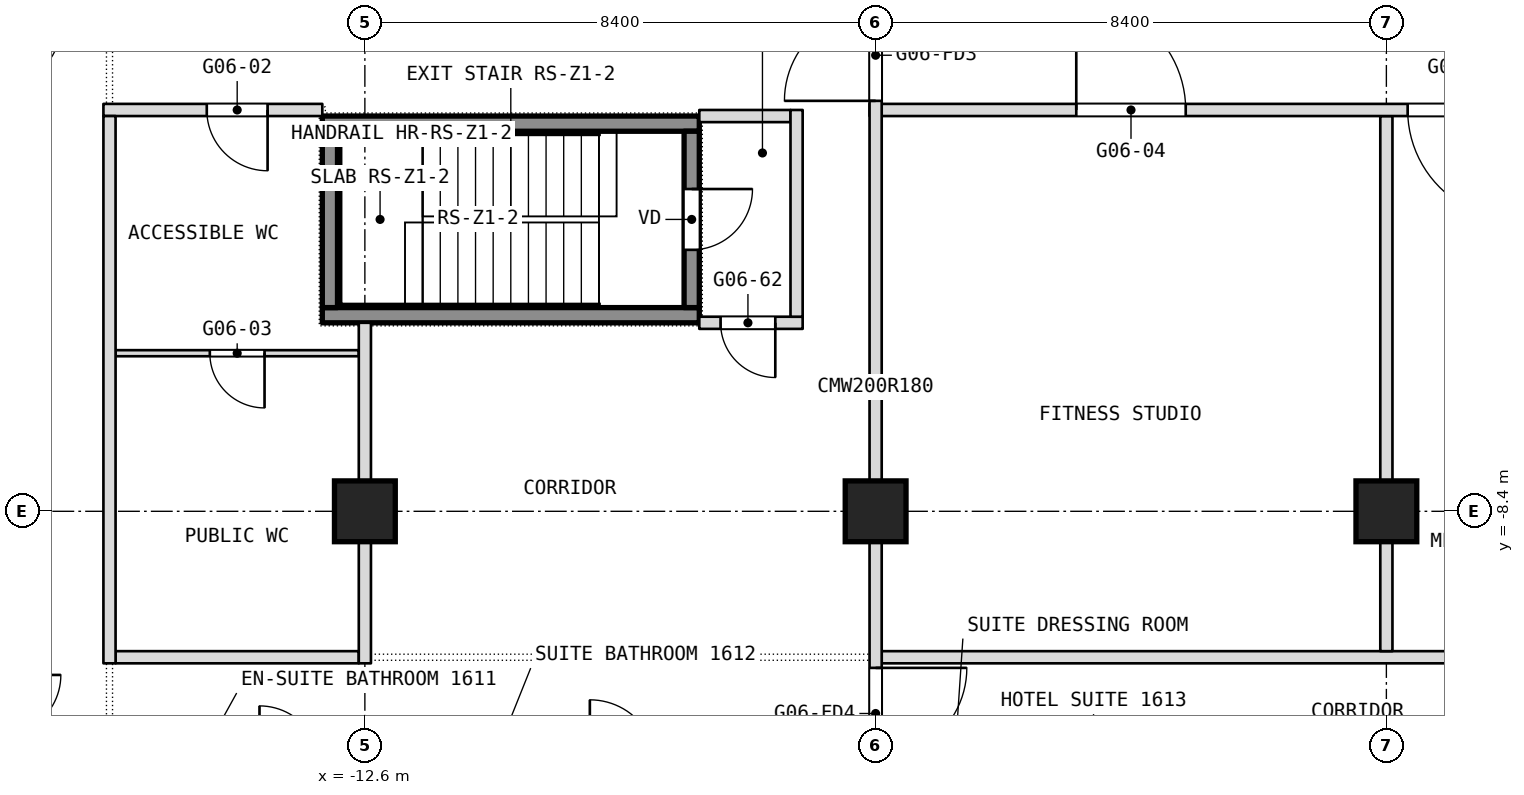
"""IFC4 building model, lengths in metres.
Left out: names, types, materials, properties, quantities, classifications, styles, units other than length and angle.
Written with IfcOpenShell. Run it as: python <this file> out.ifc"""

import sys

from ifc_helpers import new_model, si_unit, direction, frame, frame_2d, origin, origin_2d, place, context, subcontext, project, spatial, rectangle, extrude, element, fill, save


model = new_model("IFC4")
c1 = context("Model", 3, precision=1e-05, world=origin(), true_north=direction((0.0, 1.0)))
c2 = subcontext(c1, "Body", "Model", "MODEL_VIEW")
j1 = project(units=[si_unit("LENGTHUNIT", "METRE"), si_unit("PLANEANGLEUNIT", "RADIAN")], contexts=[c1])
p1 = place(None, origin())
s1 = spatial("IfcSite", under=j1, at=p1, CompositionType="ELEMENT")
p2 = place(p1, origin())
s2 = spatial("IfcBuilding", under=s1, at=p2, CompositionType="ELEMENT")
p3 = place(p2, frame((0.0, 0.0, 72.5)))
s3 = spatial("IfcBuildingStorey", under=s2, at=p3, CompositionType="ELEMENT", Elevation=72.5)
for number, where, z_axis, x_axis in (
    (1, (-12.6, -8.4, 0.0), (0.0, 0.0, 1.0), (1.0, 0.0, 0.0)),
    (2, (-4.2, -8.4, 0.0), (0.0, 0.0, 1.0), (1.0, 0.0, 0.0)),
    (3, (4.2, -8.4, 0.0), (0.0, 0.0, 1.0), (1.0, 0.0, 0.0)),
):
    element("IfcColumn", number, at=place(p3, frame(where, z_axis=z_axis, x_axis=x_axis)), inside=s3, PredefinedType="COLUMN", context=c2, shape_type="SweptSolid", body=[
        extrude(rectangle(XDim=1.0, YDim=1.0, at=origin_2d()), origin(), (0.0, 0.0, 1.0), 3.6),
    ])
p4 = place(p3, frame((-16.7, -10.8, 0.0), z_axis=(0.0, 0.0, 1.0), x_axis=(1.0, 0.0, 0.0)))
e4 = element("IfcWall", 4, at=p4, inside=s3, PredefinedType="PARTITIONING", context=c2, shape_type="SweptSolid", body=[
    extrude(rectangle(XDim=4.0, YDim=0.2, at=frame_2d((2.0, 0.0))), origin(), (0.0, 0.0, 1.0), 3.34),
])
p5 = place(p3, frame((-4.1, -10.8, 0.0), z_axis=(0.0, 0.0, 1.0), x_axis=(1.0, 0.0, 0.0)))
e5 = element("IfcWall", 5, at=p5, inside=s3, PredefinedType="PARTITIONING", context=c2, shape_type="SweptSolid", body=[
    extrude(rectangle(XDim=20.8, YDim=0.2, at=frame_2d((10.4, 0.0))), origin(), (0.0, 0.0, 1.0), 3.34),
])
p6 = place(p3, frame((-16.7, -5.8, 0.0), z_axis=(0.0, 0.0, 1.0), x_axis=(1.0, 0.0, 0.0)))
e6 = element("IfcWall", 6, at=p6, inside=s3, PredefinedType="PARTITIONING", context=c2, shape_type="SweptSolid", body=[
    extrude(rectangle(XDim=4.0, YDim=0.1, at=frame_2d((2.0, 0.0))), origin(), (0.0, 0.0, 1.0), 3.34),
])
p7 = place(p6, frame((1.55, 0.0, 0.0)))
e7 = element("IfcOpeningElement", 7, at=p7, cuts=e6, PredefinedType="OPENING", context=c2, shape_type="SweptSolid", body=[
    extrude(rectangle(XDim=0.9, YDim=2.1, at=frame_2d((0.45, 1.05))), frame((0.0, 0.05, 0.0), z_axis=(0.0, -1.0, 0.0), x_axis=(1.0, 0.0, 0.0)), (0.0, 0.0, 1.0), 0.1),
])
p8 = place(p3, frame((-7.1, -5.3, 0.0), z_axis=(0.0, 0.0, 1.0), x_axis=(1.0, 0.0, 0.0)))
e8 = element("IfcWall", 8, at=p8, inside=s3, PredefinedType="PARTITIONING", context=c2, shape_type="SweptSolid", body=[
    extrude(rectangle(XDim=1.7, YDim=0.2, at=frame_2d((0.85, 0.0))), origin(), (0.0, 0.0, 1.0), 3.34),
])
p9 = place(p8, frame((0.35, 0.0, 0.0)))
e9 = element("IfcOpeningElement", 9, at=p9, cuts=e8, PredefinedType="OPENING", context=c2, shape_type="SweptSolid", body=[
    extrude(rectangle(XDim=0.9, YDim=2.1, at=frame_2d((0.45, 1.05))), frame((0.0, 0.1, 0.0), z_axis=(0.0, -1.0, 0.0), x_axis=(1.0, 0.0, 0.0)), (0.0, 0.0, 1.0), 0.2),
])
p10 = place(p3, frame((4.2, -10.7, 0.0), z_axis=(0.0, 0.0, 1.0), x_axis=(0.0, 1.0, 0.0)))
e10 = element("IfcWall", 10, at=p10, inside=s3, PredefinedType="PARTITIONING", context=c2, shape_type="SweptSolid", body=[
    extrude(rectangle(XDim=8.8, YDim=0.2, at=frame_2d((4.4, 0.0))), origin(), (0.0, 0.0, 1.0), 3.34),
])
p11 = place(p3, frame((-7.1, -1.9, 0.0), z_axis=(0.0, 0.0, 1.0), x_axis=(1.0, 0.0, 0.0)))
e11 = element("IfcWall", 11, at=p11, inside=s3, PredefinedType="PARTITIONING", context=c2, shape_type="SweptSolid", body=[
    extrude(rectangle(XDim=1.5, YDim=0.2, at=frame_2d((0.75, 0.0))), origin(), (0.0, 0.0, 1.0), 3.34),
])
p12 = place(p3, frame((-16.9, -1.8, 0.0), z_axis=(0.0, 0.0, 1.0), x_axis=(1.0, 0.0, 0.0)))
e12 = element("IfcWall", 12, at=p12, inside=s3, PredefinedType="PARTITIONING", context=c2, shape_type="SweptSolid", body=[
    extrude(rectangle(XDim=3.6, YDim=0.2, at=frame_2d((1.8, 0.0))), origin(), (0.0, 0.0, 1.0), 3.34),
])
p13 = place(p12, frame((1.7, 0.0, 0.0)))
e13 = element("IfcOpeningElement", 13, at=p13, cuts=e12, PredefinedType="OPENING", context=c2, shape_type="SweptSolid", body=[
    extrude(rectangle(XDim=1.0, YDim=2.1, at=frame_2d((0.5, 1.05))), frame((0.0, 0.1, 0.0), z_axis=(0.0, -1.0, 0.0), x_axis=(1.0, 0.0, 0.0)), (0.0, 0.0, 1.0), 0.2),
])
p14 = place(p3, frame((-4.3, -1.8, 0.0), z_axis=(0.0, 0.0, 1.0), x_axis=(1.0, 0.0, 0.0)))
e14 = element("IfcWall", 14, at=p14, inside=s3, PredefinedType="PARTITIONING", context=c2, shape_type="SweptSolid", body=[
    extrude(rectangle(XDim=10.9, YDim=0.2, at=frame_2d((5.45, 0.0))), origin(), (0.0, 0.0, 1.0), 3.34),
])
p15 = place(p14, frame((3.4, 0.0, 0.0)))
e15 = element("IfcOpeningElement", 15, at=p15, cuts=e14, PredefinedType="OPENING", context=c2, shape_type="SweptSolid", body=[
    extrude(rectangle(XDim=1.8, YDim=2.1, at=frame_2d((0.9, 1.05))), frame((0.0, 0.1, 0.0), z_axis=(0.0, -1.0, 0.0), x_axis=(1.0, 0.0, 0.0)), (0.0, 0.0, 1.0), 0.2),
])
p16 = place(p14, frame((8.85, 0.0, 0.0)))
e16 = element("IfcOpeningElement", 16, at=p16, cuts=e14, PredefinedType="OPENING", context=c2, shape_type="SweptSolid", body=[
    extrude(rectangle(XDim=1.8, YDim=2.1, at=frame_2d((0.9, 1.05))), frame((0.0, 0.1, 0.0), z_axis=(0.0, -1.0, 0.0), x_axis=(1.0, 0.0, 0.0)), (0.0, 0.0, 1.0), 0.2),
])
p17 = place(p3, frame((-4.2, -12.7, 0.0), z_axis=(0.0, 0.0, 1.0), x_axis=(0.0, 1.0, 0.0)))
e17 = element("IfcWall", 17, at=p17, inside=s3, PredefinedType="PARTITIONING", context=c2, shape_type="SweptSolid", body=[
    extrude(rectangle(XDim=12.7, YDim=0.2, at=frame_2d((6.35, 0.0))), origin(), (0.0, 0.0, 1.0), 3.34),
])
p18 = place(p17, frame((11.05, 0.0, 0.0)))
e18 = element("IfcOpeningElement", 18, at=p18, cuts=e17, PredefinedType="OPENING", context=c2, shape_type="SweptSolid", body=[
    extrude(rectangle(XDim=1.5, YDim=2.1, at=frame_2d((0.75, 1.05))), frame((0.0, 0.1, 0.0), z_axis=(0.0, -1.0, 0.0), x_axis=(1.0, 0.0, 0.0)), (0.0, 0.0, 1.0), 0.2),
])
p19 = place(p17, frame((0.225, 0.0, 0.0)))
e19 = element("IfcOpeningElement", 19, at=p19, cuts=e17, PredefinedType="OPENING", context=c2, shape_type="SweptSolid", body=[
    extrude(rectangle(XDim=1.5, YDim=2.1, at=frame_2d((0.75, 1.05))), frame((0.0, 0.1, 0.0), z_axis=(0.0, -1.0, 0.0), x_axis=(1.0, 0.0, 0.0)), (0.0, 0.0, 1.0), 0.2),
])
p20 = place(p3, frame((-5.5, -5.2, 0.0), z_axis=(0.0, 0.0, 1.0), x_axis=(0.0, 1.0, 0.0)))
e20 = element("IfcWall", 20, at=p20, inside=s3, PredefinedType="PARTITIONING", context=c2, shape_type="SweptSolid", body=[
    extrude(rectangle(XDim=3.4, YDim=0.2, at=frame_2d((1.7, 0.0))), origin(), (0.0, 0.0, 1.0), 3.34),
])
p21 = place(p3, frame((-12.6, -10.9, 0.0), z_axis=(0.0, 0.0, 1.0), x_axis=(0.0, 1.0, 0.0)))
e21 = element("IfcWall", 21, at=p21, inside=s3, PredefinedType="PARTITIONING", context=c2, shape_type="SweptSolid", body=[
    extrude(rectangle(XDim=5.6, YDim=0.2, at=frame_2d((2.8, 0.0))), origin(), (0.0, 0.0, 1.0), 3.34),
])
p22 = place(p3, frame((-16.8, -10.9, 0.0), z_axis=(0.0, 0.0, 1.0), x_axis=(0.0, 1.0, 0.0)))
e22 = element("IfcWall", 22, at=p22, inside=s3, PredefinedType="PARTITIONING", context=c2, shape_type="SweptSolid", body=[
    extrude(rectangle(XDim=9.0, YDim=0.2, at=frame_2d((4.5, 0.0))), origin(), (0.0, 0.0, 1.0), 3.34),
])
for number, where, z_axis, x_axis in (
    (23, (-13.3, -5.175, 0.1), (0.0, 0.0, 1.0), (1.0, 0.0, 0.0)),
    (24, (-13.3, -2.025, 0.1), (0.0, 0.0, 1.0), (1.0, 0.0, 0.0)),
):
    element("IfcWall", number, at=place(p3, frame(where, z_axis=z_axis, x_axis=x_axis)), inside=s3, PredefinedType="SHEAR", context=c2, shape_type="SweptSolid", body=[
        extrude(rectangle(XDim=6.2, YDim=0.25, at=frame_2d((3.1, 0.0))), origin(), (0.0, 0.0, 1.0), 3.6),
    ])
p23 = place(p3, frame((-13.175, -5.05, 0.1), z_axis=(0.0, 0.0, 1.0), x_axis=(0.0, 1.0, 0.0)))
e25 = element("IfcWall", 25, at=p23, inside=s3, PredefinedType="SHEAR", context=c2, shape_type="SweptSolid", body=[
    extrude(rectangle(XDim=2.9, YDim=0.25, at=frame_2d((1.45, 0.0))), origin(), (0.0, 0.0, 1.0), 3.6),
])
p24 = place(p3, frame((-7.225, -5.05, 0.1), z_axis=(0.0, 0.0, 1.0), x_axis=(0.0, 1.0, 0.0)))
e26 = element("IfcWall", 26, at=p24, inside=s3, PredefinedType="SHEAR", context=c2, shape_type="SweptSolid", body=[
    extrude(rectangle(XDim=2.9, YDim=0.25, at=frame_2d((1.45, 0.0))), origin(), (0.0, 0.0, 1.0), 3.6),
])
p25 = place(p24, frame((0.95, 0.0, 0.0)))
e27 = element("IfcOpeningElement", 27, at=p25, cuts=e26, PredefinedType="OPENING", context=c2, shape_type="SweptSolid", body=[
    extrude(rectangle(XDim=1.0, YDim=2.1, at=frame_2d((0.5, 1.05))), frame((0.0, 0.125, 0.0), z_axis=(0.0, -1.0, 0.0), x_axis=(1.0, 0.0, 0.0)), (0.0, 0.0, 1.0), 0.25),
])
p26 = place(p7, origin())
e28 = element("IfcDoor", 28, at=p26, inside=s3, OperationType="SINGLE_SWING_LEFT", PredefinedType="DOOR", context=c2, shape_type="SweptSolid", body=[
    extrude(rectangle(XDim=0.9, YDim=2.1, at=frame_2d((0.45, 1.05))), frame((0.0, 0.025, 0.0), z_axis=(0.0, -1.0, 0.0), x_axis=(1.0, 0.0, 0.0)), (0.0, 0.0, 1.0), 0.05),
])
fill(e7, e28)
p27 = place(p9, origin())
e29 = element("IfcDoor", 29, at=p27, inside=s3, OperationType="SINGLE_SWING_RIGHT", PredefinedType="DOOR", context=c2, shape_type="SweptSolid", body=[
    extrude(rectangle(XDim=0.9, YDim=2.1, at=frame_2d((0.45, 1.05))), frame((0.0, 0.025, 0.0), z_axis=(0.0, -1.0, 0.0), x_axis=(1.0, 0.0, 0.0)), (0.0, 0.0, 1.0), 0.05),
])
fill(e9, e29)
p28 = place(p13, origin())
e30 = element("IfcDoor", 30, at=p28, inside=s3, OperationType="SINGLE_SWING_RIGHT", PredefinedType="DOOR", context=c2, shape_type="SweptSolid", body=[
    extrude(rectangle(XDim=1.0, YDim=2.1, at=frame_2d((0.5, 1.05))), frame((0.0, 0.025, 0.0), z_axis=(0.0, -1.0, 0.0), x_axis=(1.0, 0.0, 0.0)), (0.0, 0.0, 1.0), 0.05),
])
fill(e13, e30)
p29 = place(p15, origin())
e31 = element("IfcDoor", 31, at=p29, inside=s3, OperationType="DOUBLE_DOOR_SINGLE_SWING", PredefinedType="DOOR", context=c2, shape_type="SweptSolid", body=[
    extrude(rectangle(XDim=1.8, YDim=2.1, at=frame_2d((0.9, 1.05))), frame((0.0, 0.025, 0.0), z_axis=(0.0, -1.0, 0.0), x_axis=(1.0, 0.0, 0.0)), (0.0, 0.0, 1.0), 0.05),
])
fill(e15, e31)
p30 = place(p16, origin())
e32 = element("IfcDoor", 32, at=p30, inside=s3, OperationType="DOUBLE_DOOR_SINGLE_SWING", PredefinedType="DOOR", context=c2, shape_type="SweptSolid", body=[
    extrude(rectangle(XDim=1.8, YDim=2.1, at=frame_2d((0.9, 1.05))), frame((0.0, 0.025, 0.0), z_axis=(0.0, -1.0, 0.0), x_axis=(1.0, 0.0, 0.0)), (0.0, 0.0, 1.0), 0.05),
])
fill(e16, e32)
p31 = place(p25, origin())
e33 = element("IfcDoor", 33, at=p31, inside=s3, OperationType="SINGLE_SWING_LEFT", PredefinedType="DOOR", context=c2, shape_type="SweptSolid", body=[
    extrude(rectangle(XDim=1.0, YDim=2.1, at=frame_2d((0.5, 1.05))), frame((0.0, 0.025, 0.0), z_axis=(0.0, -1.0, 0.0), x_axis=(1.0, 0.0, 0.0)), (0.0, 0.0, 1.0), 0.05),
])
fill(e27, e33)
p32 = place(p18, origin())
e34 = element("IfcDoor", 34, at=p32, inside=s3, OperationType="DOUBLE_DOOR_DOUBLE_SWING", PredefinedType="DOOR", context=c2, shape_type="SweptSolid", body=[
    extrude(rectangle(XDim=1.5, YDim=2.1, at=frame_2d((0.75, 1.05))), frame((0.0, 0.025, 0.0), z_axis=(0.0, -1.0, 0.0), x_axis=(1.0, 0.0, 0.0)), (0.0, 0.0, 1.0), 0.05),
])
fill(e18, e34)
p33 = place(p19, origin())
e35 = element("IfcDoor", 35, at=p33, inside=s3, OperationType="DOUBLE_DOOR_DOUBLE_SWING", PredefinedType="DOOR", context=c2, shape_type="SweptSolid", body=[
    extrude(rectangle(XDim=1.5, YDim=2.1, at=frame_2d((0.75, 1.05))), frame((0.0, 0.025, 0.0), z_axis=(0.0, -1.0, 0.0), x_axis=(1.0, 0.0, 0.0)), (0.0, 0.0, 1.0), 0.05),
])
fill(e19, e35)
save(model, sys.argv[1])
